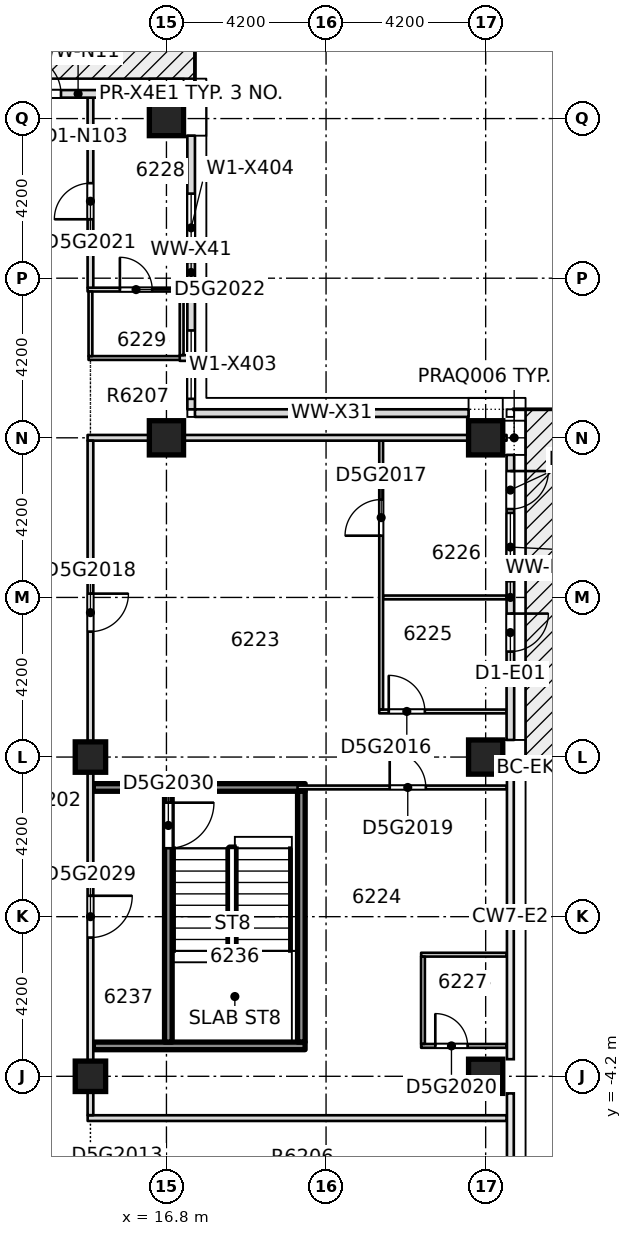
"""IFC4 building model, lengths in metres.
Left out: names, types, materials, properties, quantities, classifications, styles, units other than length and angle.
Written with IfcOpenShell. Run it as: python <this file> out.ifc"""

import sys

from ifc_helpers import new_model, si_unit, direction, frame, frame_2d, origin, origin_2d, place, context, subcontext, project, spatial, rectangle, extrude, element, fill, save


model = new_model("IFC4")
c1 = context("Model", 3, precision=1e-05, world=origin(), true_north=direction((0.0, 1.0)))
c2 = subcontext(c1, "Body", "Model", "MODEL_VIEW")
j1 = project(units=[si_unit("LENGTHUNIT", "METRE"), si_unit("PLANEANGLEUNIT", "RADIAN")], contexts=[c1])
p1 = place(None, origin())
s1 = spatial("IfcSite", under=j1, at=p1, CompositionType="ELEMENT")
p2 = place(p1, origin())
s2 = spatial("IfcBuilding", under=s1, at=p2, CompositionType="ELEMENT")
p3 = place(p2, frame((0.0, 0.0, 237.25)))
s3 = spatial("IfcBuildingStorey", under=s2, at=p3, CompositionType="ELEMENT", Elevation=237.25)
for number, where, z_axis, x_axis in (
    (1, (25.2, -4.2, -0.4), (0.0, 0.0, 1.0), (1.0, 0.0, 0.0)),
    (2, (25.2, 4.2, -0.4), (0.0, 0.0, 1.0), (1.0, 0.0, 0.0)),
    (3, (16.8, 12.6, -0.4), (0.0, 0.0, 1.0), (1.0, 0.0, 0.0)),
    (4, (25.2, 12.6, -0.4), (0.0, 0.0, 1.0), (1.0, 0.0, 0.0)),
    (5, (16.8, 21.0, -0.4), (0.0, 0.0, 1.0), (1.0, 0.0, 0.0)),
):
    element("IfcColumn", number, at=place(p3, frame(where, z_axis=z_axis, x_axis=x_axis)), inside=s3, PredefinedType="COLUMN", context=c2, shape_type="SweptSolid", body=[
        extrude(rectangle(XDim=0.9, YDim=0.9, at=origin_2d()), origin(), (0.0, 0.0, 1.0), 3.45),
    ])
for number, where, z_axis, x_axis in (
    (6, (14.8, -4.2, -0.4), (0.0, 0.0, 1.0), (1.0, 0.0, 0.0)),
    (7, (14.8, 4.2, -0.4), (0.0, 0.0, 1.0), (1.0, 0.0, 0.0)),
):
    element("IfcColumn", number, at=place(p3, frame(where, z_axis=z_axis, x_axis=x_axis)), inside=s3, PredefinedType="COLUMN", context=c2, shape_type="SweptSolid", body=[
        extrude(rectangle(XDim=0.8, YDim=0.8, at=origin_2d()), origin(), (0.0, 0.0, 1.0), 3.45),
    ])
p4 = place(p3, frame((14.727, -5.3, 0.0), z_axis=(0.0, 0.0, 1.0), x_axis=(1.0, 0.0, 0.0)))
e8 = element("IfcWall", 8, at=p4, inside=s3, PredefinedType="PARTITIONING", context=c2, shape_type="SweptSolid", body=[
    extrude(rectangle(XDim=11.023, YDim=0.15, at=frame_2d((5.511, 0.0))), origin(), (0.0, 0.0, 1.0), 3.05),
])
p5 = place(p3, frame((14.877, -3.4, 0.0), z_axis=(0.0, 0.0, 1.0), x_axis=(1.0, 0.0, 0.0)))
e9 = element("IfcWall", 9, at=p5, inside=s3, PredefinedType="SOLIDWALL", context=c2, shape_type="SweptSolid", body=[
    extrude(rectangle(XDim=5.571, YDim=0.2, at=frame_2d((2.786, 0.0))), origin(), (0.0, 0.0, 1.0), 3.05),
])
p6 = place(p3, frame((23.502, -3.4, 0.0), z_axis=(0.0, 0.0, 1.0), x_axis=(1.0, 0.0, 0.0)))
e10 = element("IfcWall", 10, at=p6, inside=s3, PredefinedType="PARTITIONING", context=c2, shape_type="SweptSolid", body=[
    extrude(rectangle(XDim=2.248, YDim=0.1, at=frame_2d((1.124, 0.0))), origin(), (0.0, 0.0, 1.0), 3.05),
])
p7 = place(p6, frame((0.373, 0.0, 0.0)))
e11 = element("IfcOpeningElement", 11, at=p7, cuts=e10, PredefinedType="OPENING", context=c2, shape_type="SweptSolid", body=[
    extrude(rectangle(XDim=0.85, YDim=2.1, at=frame_2d((0.425, 1.05))), frame((0.0, 0.06, 0.0), z_axis=(0.0, -1.0, 0.0), x_axis=(1.0, 0.0, 0.0)), (0.0, 0.0, 1.0), 0.12),
])
p8 = place(p3, frame((23.502, -1.0, 0.0), z_axis=(0.0, 0.0, 1.0), x_axis=(1.0, 0.0, 0.0)))
e12 = element("IfcWall", 12, at=p8, inside=s3, PredefinedType="PARTITIONING", context=c2, shape_type="SweptSolid", body=[
    extrude(rectangle(XDim=2.248, YDim=0.1, at=frame_2d((1.124, 0.0))), origin(), (0.0, 0.0, 1.0), 3.05),
])
p9 = place(p3, frame((14.875, 3.4, 0.0), z_axis=(0.0, 0.0, 1.0), x_axis=(1.0, 0.0, 0.0)))
e13 = element("IfcWall", 13, at=p9, inside=s3, PredefinedType="SOLIDWALL", context=c2, shape_type="SweptSolid", body=[
    extrude(rectangle(XDim=5.575, YDim=0.2, at=frame_2d((2.788, 0.0))), origin(), (0.0, 0.0, 1.0), 3.05),
])
p10 = place(p3, frame((20.25, 3.4, 0.0), z_axis=(0.0, 0.0, 1.0), x_axis=(1.0, 0.0, 0.0)))
e14 = element("IfcWall", 14, at=p10, inside=s3, PredefinedType="PARTITIONING", context=c2, shape_type="SweptSolid", body=[
    extrude(rectangle(XDim=5.5, YDim=0.1, at=frame_2d((2.75, 0.0))), origin(), (0.0, 0.0, 1.0), 3.05),
])
p11 = place(p10, frame((2.425, 0.0, 0.0)))
e15 = element("IfcOpeningElement", 15, at=p11, cuts=e14, PredefinedType="OPENING", context=c2, shape_type="SweptSolid", body=[
    extrude(rectangle(XDim=0.95, YDim=2.1, at=frame_2d((0.475, 1.05))), frame((0.0, 0.06, 0.0), z_axis=(0.0, -1.0, 0.0), x_axis=(1.0, 0.0, 0.0)), (0.0, 0.0, 1.0), 0.12),
])
p12 = place(p3, frame((22.4, 5.4, 0.0), z_axis=(0.0, 0.0, 1.0), x_axis=(1.0, 0.0, 0.0)))
e16 = element("IfcWall", 16, at=p12, inside=s3, PredefinedType="PARTITIONING", context=c2, shape_type="SweptSolid", body=[
    extrude(rectangle(XDim=3.35, YDim=0.1, at=frame_2d((1.675, 0.0))), origin(), (0.0, 0.0, 1.0), 3.05),
])
p13 = place(p12, frame((0.25, 0.0, 0.0)))
e17 = element("IfcOpeningElement", 17, at=p13, cuts=e16, PredefinedType="OPENING", context=c2, shape_type="SweptSolid", body=[
    extrude(rectangle(XDim=0.95, YDim=2.1, at=frame_2d((0.475, 1.05))), frame((0.0, 0.06, 0.0), z_axis=(0.0, -1.0, 0.0), x_axis=(1.0, 0.0, 0.0)), (0.0, 0.0, 1.0), 0.12),
])
p14 = place(p3, frame((22.5, 8.4, 0.0), z_axis=(0.0, 0.0, 1.0), x_axis=(1.0, 0.0, 0.0)))
e18 = element("IfcWall", 18, at=p14, inside=s3, PredefinedType="PARTITIONING", context=c2, shape_type="SweptSolid", body=[
    extrude(rectangle(XDim=3.25, YDim=0.1, at=frame_2d((1.625, 0.0))), origin(), (0.0, 0.0, 1.0), 3.05),
])
p15 = place(p3, frame((14.725, 12.6, 0.0), z_axis=(0.0, 0.0, 1.0), x_axis=(1.0, 0.0, 0.0)))
e19 = element("IfcWall", 19, at=p15, inside=s3, PredefinedType="PARTITIONING", context=c2, shape_type="SweptSolid", body=[
    extrude(rectangle(XDim=2.525, YDim=0.15, at=frame_2d((1.262, 0.0))), origin(), (0.0, 0.0, 1.0), 3.05),
])
p16 = place(p3, frame((14.75, 14.7, 0.0), z_axis=(0.0, 0.0, 1.0), x_axis=(1.0, 0.0, 0.0)))
e20 = element("IfcWall", 20, at=p16, inside=s3, PredefinedType="PARTITIONING", context=c2, shape_type="SweptSolid", body=[
    extrude(rectangle(XDim=2.5, YDim=0.1, at=frame_2d((1.25, 0.0))), origin(), (0.0, 0.0, 1.0), 3.05),
])
p17 = place(p3, frame((17.15, 14.7, 0.0), z_axis=(0.0, 0.0, 1.0), x_axis=(1.0, 0.0, 0.0)))
e21 = element("IfcWall", 21, at=p17, inside=s3, PredefinedType="PARTITIONING", context=c2, shape_type="SweptSolid", body=[
    extrude(rectangle(XDim=0.2, YDim=0.15, at=frame_2d((0.1, 0.0))), origin(), (0.0, 0.0, 1.0), 3.05),
])
p18 = place(p3, frame((14.725, 16.5, 0.0), z_axis=(0.0, 0.0, 1.0), x_axis=(1.0, 0.0, 0.0)))
e22 = element("IfcWall", 22, at=p18, inside=s3, PredefinedType="PARTITIONING", context=c2, shape_type="SweptSolid", body=[
    extrude(rectangle(XDim=2.525, YDim=0.1, at=frame_2d((1.262, 0.0))), origin(), (0.0, 0.0, 1.0), 3.05),
])
p19 = place(p18, frame((0.85, 0.0, 0.0)))
e23 = element("IfcOpeningElement", 23, at=p19, cuts=e22, PredefinedType="OPENING", context=c2, shape_type="SweptSolid", body=[
    extrude(rectangle(XDim=0.85, YDim=2.1, at=frame_2d((0.425, 1.05))), frame((0.0, 0.06, 0.0), z_axis=(0.0, -1.0, 0.0), x_axis=(1.0, 0.0, 0.0)), (0.0, 0.0, 1.0), 0.12),
])
p20 = place(p3, frame((14.8, -5.223, 0.0), z_axis=(0.0, 0.0, 1.0), x_axis=(0.0, 1.0, 0.0)))
e24 = element("IfcWall", 24, at=p20, inside=s3, PredefinedType="PARTITIONING", context=c2, shape_type="SweptSolid", body=[
    extrude(rectangle(XDim=17.748, YDim=0.15, at=frame_2d((8.874, 0.0))), origin(), (0.0, 0.0, 1.0), 3.05),
])
p21 = place(p20, frame((12.723, 0.0, 0.0)))
e25 = element("IfcOpeningElement", 25, at=p21, cuts=e24, PredefinedType="OPENING", context=c2, shape_type="SweptSolid", body=[
    extrude(rectangle(XDim=1.0, YDim=2.1, at=frame_2d((0.5, 1.05))), frame((0.0, 0.085, 0.0), z_axis=(0.0, -1.0, 0.0), x_axis=(1.0, 0.0, 0.0)), (0.0, 0.0, 1.0), 0.17),
])
p22 = place(p20, frame((4.673, 0.0, 0.0)))
e26 = element("IfcOpeningElement", 26, at=p22, cuts=e24, PredefinedType="OPENING", context=c2, shape_type="SweptSolid", body=[
    extrude(rectangle(XDim=1.1, YDim=2.1, at=frame_2d((0.55, 1.05))), frame((0.0, 0.085, 0.0), z_axis=(0.0, -1.0, 0.0), x_axis=(1.0, 0.0, 0.0)), (0.0, 0.0, 1.0), 0.17),
])
p23 = place(p3, frame((14.8, 14.75, 0.0), z_axis=(0.0, 0.0, 1.0), x_axis=(0.0, 1.0, 0.0)))
e27 = element("IfcWall", 27, at=p23, inside=s3, PredefinedType="PARTITIONING", context=c2, shape_type="SweptSolid", body=[
    extrude(rectangle(XDim=1.7, YDim=0.1, at=frame_2d((0.85, 0.0))), origin(), (0.0, 0.0, 1.0), 3.05),
])
p24 = place(p3, frame((14.8, 16.55, 0.0), z_axis=(0.0, 0.0, 1.0), x_axis=(0.0, 1.0, 0.0)))
e28 = element("IfcWall", 28, at=p24, inside=s3, PredefinedType="PARTITIONING", context=c2, shape_type="SweptSolid", body=[
    extrude(rectangle(XDim=5.0, YDim=0.15, at=frame_2d((2.5, 0.0))), origin(), (0.0, 0.0, 1.0), 3.05),
])
p25 = place(p24, frame((1.8, 0.0, 0.0)))
e29 = element("IfcOpeningElement", 29, at=p25, cuts=e28, PredefinedType="OPENING", context=c2, shape_type="SweptSolid", body=[
    extrude(rectangle(XDim=0.95, YDim=2.1, at=frame_2d((0.475, 1.05))), frame((0.0, 0.085, 0.0), z_axis=(0.0, -1.0, 0.0), x_axis=(1.0, 0.0, 0.0)), (0.0, 0.0, 1.0), 0.17),
])
p26 = place(p3, frame((16.85, -3.3, 0.0), z_axis=(0.0, 0.0, 1.0), x_axis=(0.0, 1.0, 0.0)))
e30 = element("IfcWall", 30, at=p26, inside=s3, PredefinedType="SOLIDWALL", context=c2, shape_type="SweptSolid", body=[
    extrude(rectangle(XDim=6.6, YDim=0.2, at=frame_2d((3.3, 0.0))), origin(), (0.0, 0.0, 1.0), 3.05),
])
p27 = place(p26, frame((5.1, 0.0, 0.0)))
e31 = element("IfcOpeningElement", 31, at=p27, cuts=e30, PredefinedType="OPENING", context=c2, shape_type="SweptSolid", body=[
    extrude(rectangle(XDim=1.2, YDim=2.1, at=frame_2d((0.6, 1.05))), frame((0.0, 0.11, 0.0), z_axis=(0.0, -1.0, 0.0), x_axis=(1.0, 0.0, 0.0)), (0.0, 0.0, 1.0), 0.22),
])
p28 = place(p3, frame((17.2, 14.775, 0.0), z_axis=(0.0, 0.0, 1.0), x_axis=(0.0, 1.0, 0.0)))
e32 = element("IfcWall", 32, at=p28, inside=s3, PredefinedType="PARTITIONING", context=c2, shape_type="SweptSolid", body=[
    extrude(rectangle(XDim=1.675, YDim=0.1, at=frame_2d((0.837, 0.0))), origin(), (0.0, 0.0, 1.0), 3.05),
])
p29 = place(p3, frame((22.45, 5.45, 0.0), z_axis=(0.0, 0.0, 1.0), x_axis=(0.0, 1.0, 0.0)))
e33 = element("IfcWall", 33, at=p29, inside=s3, PredefinedType="PARTITIONING", context=c2, shape_type="SweptSolid", body=[
    extrude(rectangle(XDim=7.075, YDim=0.1, at=frame_2d((3.538, 0.0))), origin(), (0.0, 0.0, 1.0), 3.05),
])
p30 = place(p29, frame((4.575, 0.0, 0.0)))
e34 = element("IfcOpeningElement", 34, at=p30, cuts=e33, PredefinedType="OPENING", context=c2, shape_type="SweptSolid", body=[
    extrude(rectangle(XDim=0.95, YDim=2.1, at=frame_2d((0.475, 1.05))), frame((0.0, 0.06, 0.0), z_axis=(0.0, -1.0, 0.0), x_axis=(1.0, 0.0, 0.0)), (0.0, 0.0, 1.0), 0.12),
])
p31 = place(p3, frame((23.55, -3.348, 0.0), z_axis=(0.0, 0.0, 1.0), x_axis=(0.0, 1.0, 0.0)))
e35 = element("IfcWall", 35, at=p31, inside=s3, PredefinedType="PARTITIONING", context=c2, shape_type="SweptSolid", body=[
    extrude(rectangle(XDim=2.296, YDim=0.1, at=frame_2d((1.148, 0.0))), origin(), (0.0, 0.0, 1.0), 3.05),
])
p32 = place(p3, frame((25.85, 4.65, 0.0), z_axis=(0.0, 0.0, 1.0), x_axis=(0.0, 1.0, 0.0)))
e36 = element("IfcWall", 36, at=p32, inside=s3, PredefinedType="STANDARD", context=c2, shape_type="SweptSolid", body=[
    extrude(rectangle(XDim=7.5, YDim=0.2, at=frame_2d((3.75, 0.0))), origin(), (0.0, 0.0, 1.0), 3.05),
])
p33 = place(p32, frame((2.325, 0.0, 0.0)))
e37 = element("IfcOpeningElement", 37, at=p33, cuts=e36, PredefinedType="OPENING", context=c2, shape_type="SweptSolid", body=[
    extrude(rectangle(XDim=1.0, YDim=2.4, at=frame_2d((0.5, 1.2))), frame((0.0, 0.11, 0.0), z_axis=(0.0, -1.0, 0.0), x_axis=(1.0, 0.0, 0.0)), (0.0, 0.0, 1.0), 0.22),
])
p34 = place(p32, frame((4.175, 0.0, 0.2)))
e38 = element("IfcOpeningElement", 38, at=p34, cuts=e36, PredefinedType="OPENING", context=c2, shape_type="SweptSolid", body=[
    extrude(rectangle(XDim=1.8, YDim=2.65, at=frame_2d((0.9, 1.325))), frame((0.0, 0.11, 0.0), z_axis=(0.0, -1.0, 0.0), x_axis=(1.0, 0.0, 0.0)), (0.0, 0.0, 1.0), 0.22),
])
p35 = place(p32, frame((6.075, 0.0, 0.0)))
e39 = element("IfcOpeningElement", 39, at=p35, cuts=e36, PredefinedType="OPENING", context=c2, shape_type="SweptSolid", body=[
    extrude(rectangle(XDim=1.0, YDim=2.4, at=frame_2d((0.5, 1.2))), frame((0.0, 0.11, 0.0), z_axis=(0.0, -1.0, 0.0), x_axis=(1.0, 0.0, 0.0)), (0.0, 0.0, 1.0), 0.22),
])
p36 = place(p3, frame((24.75, 13.25, 0.0), z_axis=(0.0, 0.0, 1.0), x_axis=(-1.0, 0.0, 0.0)))
e40 = element("IfcWall", 40, at=p36, inside=s3, PredefinedType="STANDARD", context=c2, shape_type="SweptSolid", body=[
    extrude(rectangle(XDim=7.2, YDim=0.2, at=frame_2d((3.6, 0.0))), origin(), (0.0, 0.0, 1.0), 3.05),
])
p37 = place(p3, frame((17.45, 13.35, 0.0), z_axis=(0.0, 0.0, 1.0), x_axis=(0.0, 1.0, 0.0)))
e41 = element("IfcWall", 41, at=p37, inside=s3, PredefinedType="STANDARD", context=c2, shape_type="SweptSolid", body=[
    extrude(rectangle(XDim=7.2, YDim=0.2, at=frame_2d((3.6, 0.0))), origin(), (0.0, 0.0, 1.0), 3.05),
])
p38 = place(p37, frame((0.275, 0.0, 0.2)))
e42 = element("IfcOpeningElement", 42, at=p38, cuts=e41, PredefinedType="OPENING", context=c2, shape_type="SweptSolid", body=[
    extrude(rectangle(XDim=1.8, YDim=2.65, at=frame_2d((0.9, 1.325))), frame((0.0, 0.11, 0.0), z_axis=(0.0, -1.0, 0.0), x_axis=(1.0, 0.0, 0.0)), (0.0, 0.0, 1.0), 0.22),
])
p39 = place(p37, frame((3.875, 0.0, 0.2)))
e43 = element("IfcOpeningElement", 43, at=p39, cuts=e41, PredefinedType="OPENING", context=c2, shape_type="SweptSolid", body=[
    extrude(rectangle(XDim=1.8, YDim=2.65, at=frame_2d((0.9, 1.325))), frame((0.0, 0.11, 0.0), z_axis=(0.0, -1.0, 0.0), x_axis=(1.0, 0.0, 0.0)), (0.0, 0.0, 1.0), 0.22),
])
p40 = place(p3, frame((16.35, 21.65, 0.0), z_axis=(0.0, 0.0, 1.0), x_axis=(-1.0, 0.0, 0.0)))
e44 = element("IfcWall", 44, at=p40, inside=s3, PredefinedType="STANDARD", context=c2, shape_type="SweptSolid", body=[
    extrude(rectangle(XDim=3.75, YDim=0.2, at=frame_2d((1.875, 0.0))), origin(), (0.0, 0.0, 1.0), 3.05),
])
p41 = place(p40, frame((2.325, 0.0, 0.0)))
e45 = element("IfcOpeningElement", 45, at=p41, cuts=e44, PredefinedType="OPENING", context=c2, shape_type="SweptSolid", body=[
    extrude(rectangle(XDim=1.0, YDim=2.4, at=frame_2d((0.5, 1.2))), frame((0.0, 0.11, 0.0), z_axis=(0.0, -1.0, 0.0), x_axis=(1.0, 0.0, 0.0)), (0.0, 0.0, 1.0), 0.22),
])
p42 = place(p3, frame((20.35, -3.298, 0.0), z_axis=(0.0, 0.0, 1.0), x_axis=(0.0, 1.0, 0.0)))
e46 = element("IfcWall", 46, at=p42, inside=s3, PredefinedType="SOLIDWALL", context=c2, shape_type="SweptSolid", body=[
    extrude(rectangle(XDim=6.598, YDim=0.2, at=frame_2d((3.299, 0.0))), origin(), (0.0, 0.0, 1.0), 3.05),
])
p43 = place(p3, frame((17.25, 12.6, 0.0), z_axis=(0.0, 0.0, 1.0), x_axis=(1.0, 0.0, 0.0)))
e47 = element("IfcWall", 47, at=p43, inside=s3, PredefinedType="PARTITIONING", context=c2, shape_type="SweptSolid", body=[
    extrude(rectangle(XDim=7.5, YDim=0.15, at=frame_2d((3.75, 0.0))), origin(), (0.0, 0.0, 1.0), 2.5),
])
p44 = place(p3, frame((24.75, 12.6, 0.0), z_axis=(0.0, 0.0, 1.0), x_axis=(1.0, 0.0, 0.0)))
e48 = element("IfcWall", 48, at=p44, inside=s3, PredefinedType="PARTITIONING", context=c2, shape_type="SweptSolid", body=[
    extrude(rectangle(XDim=1.0, YDim=0.15, at=frame_2d((0.5, 0.0))), origin(), (0.0, 0.0, 1.0), 3.05),
])
p45 = place(p13, origin())
e49 = element("IfcDoor", 49, at=p45, inside=s3, OperationType="SINGLE_SWING_LEFT", PredefinedType="DOOR", context=c2, shape_type="SweptSolid", body=[
    extrude(rectangle(XDim=0.95, YDim=2.1, at=frame_2d((0.475, 1.05))), frame((0.0, 0.025, 0.0), z_axis=(0.0, -1.0, 0.0), x_axis=(1.0, 0.0, 0.0)), (0.0, 0.0, 1.0), 0.05),
])
fill(e17, e49)
p46 = place(p30, origin())
e50 = element("IfcDoor", 50, at=p46, inside=s3, OperationType="SINGLE_SWING_RIGHT", PredefinedType="DOOR", context=c2, shape_type="SweptSolid", body=[
    extrude(rectangle(XDim=0.95, YDim=2.1, at=frame_2d((0.475, 1.05))), frame((0.0, 0.025, 0.0), z_axis=(0.0, -1.0, 0.0), x_axis=(1.0, 0.0, 0.0)), (0.0, 0.0, 1.0), 0.05),
])
fill(e34, e50)
p47 = place(p21, origin())
e51 = element("IfcDoor", 51, at=p47, inside=s3, OperationType="SINGLE_SWING_LEFT", PredefinedType="DOOR", context=c2, shape_type="SweptSolid", body=[
    extrude(rectangle(XDim=1.0, YDim=2.1, at=frame_2d((0.5, 1.05))), frame((0.0, 0.025, 0.0), z_axis=(0.0, -1.0, 0.0), x_axis=(1.0, 0.0, 0.0)), (0.0, 0.0, 1.0), 0.05),
])
fill(e25, e51)
p48 = place(p11, origin())
e52 = element("IfcDoor", 52, at=p48, inside=s3, OperationType="SINGLE_SWING_LEFT", PredefinedType="DOOR", context=c2, shape_type="SweptSolid", body=[
    extrude(rectangle(XDim=0.95, YDim=2.1, at=frame_2d((0.475, 1.05))), frame((0.0, 0.025, 0.0), z_axis=(0.0, -1.0, 0.0), x_axis=(1.0, 0.0, 0.0)), (0.0, 0.0, 1.0), 0.05),
])
fill(e15, e52)
p49 = place(p7, origin())
e53 = element("IfcDoor", 53, at=p49, inside=s3, OperationType="SINGLE_SWING_LEFT", PredefinedType="DOOR", context=c2, shape_type="SweptSolid", body=[
    extrude(rectangle(XDim=0.85, YDim=2.1, at=frame_2d((0.425, 1.05))), frame((0.0, 0.025, 0.0), z_axis=(0.0, -1.0, 0.0), x_axis=(1.0, 0.0, 0.0)), (0.0, 0.0, 1.0), 0.05),
])
fill(e11, e53)
p50 = place(p25, origin())
e54 = element("IfcDoor", 54, at=p50, inside=s3, OperationType="SINGLE_SWING_LEFT", PredefinedType="DOOR", context=c2, shape_type="SweptSolid", body=[
    extrude(rectangle(XDim=0.95, YDim=2.1, at=frame_2d((0.475, 1.05))), frame((0.0, 0.025, 0.0), z_axis=(0.0, -1.0, 0.0), x_axis=(1.0, 0.0, 0.0)), (0.0, 0.0, 1.0), 0.05),
])
fill(e29, e54)
p51 = place(p19, origin())
e55 = element("IfcDoor", 55, at=p51, inside=s3, OperationType="SINGLE_SWING_RIGHT", PredefinedType="DOOR", context=c2, shape_type="SweptSolid", body=[
    extrude(rectangle(XDim=0.85, YDim=2.1, at=frame_2d((0.425, 1.05))), frame((0.0, 0.025, 0.0), z_axis=(0.0, -1.0, 0.0), x_axis=(1.0, 0.0, 0.0)), (0.0, 0.0, 1.0), 0.05),
])
fill(e23, e55)
p52 = place(p22, origin())
e56 = element("IfcDoor", 56, at=p52, inside=s3, OperationType="SINGLE_SWING_RIGHT", PredefinedType="DOOR", context=c2, shape_type="SweptSolid", body=[
    extrude(rectangle(XDim=1.1, YDim=2.1, at=frame_2d((0.55, 1.05))), frame((0.0, 0.025, 0.0), z_axis=(0.0, -1.0, 0.0), x_axis=(1.0, 0.0, 0.0)), (0.0, 0.0, 1.0), 0.05),
])
fill(e26, e56)
p53 = place(p27, origin())
e57 = element("IfcDoor", 57, at=p53, inside=s3, OperationType="SINGLE_SWING_LEFT", PredefinedType="DOOR", context=c2, shape_type="SweptSolid", body=[
    extrude(rectangle(XDim=1.2, YDim=2.1, at=frame_2d((0.6, 1.05))), frame((0.0, 0.025, 0.0), z_axis=(0.0, -1.0, 0.0), x_axis=(1.0, 0.0, 0.0)), (0.0, 0.0, 1.0), 0.05),
])
fill(e31, e57)
p54 = place(p33, origin())
e58 = element("IfcDoor", 58, at=p54, inside=s3, OperationType="SINGLE_SWING_LEFT", PredefinedType="DOOR", context=c2, shape_type="SweptSolid", body=[
    extrude(rectangle(XDim=1.0, YDim=2.4, at=frame_2d((0.5, 1.2))), frame((0.0, 0.025, 0.0), z_axis=(0.0, -1.0, 0.0), x_axis=(1.0, 0.0, 0.0)), (0.0, 0.0, 1.0), 0.05),
])
fill(e37, e58)
p55 = place(p34, origin())
e59 = element("IfcWindow", 59, at=p55, inside=s3, PartitioningType="SINGLE_PANEL", PredefinedType="WINDOW", context=c2, shape_type="SweptSolid", body=[
    extrude(rectangle(XDim=1.8, YDim=2.65, at=frame_2d((0.9, 1.325))), frame((0.0, 0.03, 0.0), z_axis=(0.0, -1.0, 0.0), x_axis=(1.0, 0.0, 0.0)), (0.0, 0.0, 1.0), 0.06),
])
fill(e38, e59)
p56 = place(p35, origin())
e60 = element("IfcDoor", 60, at=p56, inside=s3, OperationType="SINGLE_SWING_LEFT", PredefinedType="DOOR", context=c2, shape_type="SweptSolid", body=[
    extrude(rectangle(XDim=1.0, YDim=2.4, at=frame_2d((0.5, 1.2))), frame((0.0, 0.025, 0.0), z_axis=(0.0, -1.0, 0.0), x_axis=(1.0, 0.0, 0.0)), (0.0, 0.0, 1.0), 0.05),
])
fill(e39, e60)
p57 = place(p38, origin())
e61 = element("IfcWindow", 61, at=p57, inside=s3, PartitioningType="SINGLE_PANEL", PredefinedType="WINDOW", context=c2, shape_type="SweptSolid", body=[
    extrude(rectangle(XDim=1.8, YDim=2.65, at=frame_2d((0.9, 1.325))), frame((0.0, 0.03, 0.0), z_axis=(0.0, -1.0, 0.0), x_axis=(1.0, 0.0, 0.0)), (0.0, 0.0, 1.0), 0.06),
])
fill(e42, e61)
p58 = place(p39, origin())
e62 = element("IfcWindow", 62, at=p58, inside=s3, PartitioningType="SINGLE_PANEL", PredefinedType="WINDOW", context=c2, shape_type="SweptSolid", body=[
    extrude(rectangle(XDim=1.8, YDim=2.65, at=frame_2d((0.9, 1.325))), frame((0.0, 0.03, 0.0), z_axis=(0.0, -1.0, 0.0), x_axis=(1.0, 0.0, 0.0)), (0.0, 0.0, 1.0), 0.06),
])
fill(e43, e62)
p59 = place(p41, origin())
e63 = element("IfcDoor", 63, at=p59, inside=s3, OperationType="SINGLE_SWING_LEFT", PredefinedType="DOOR", context=c2, shape_type="SweptSolid", body=[
    extrude(rectangle(XDim=1.0, YDim=2.4, at=frame_2d((0.5, 1.2))), frame((0.0, 0.025, 0.0), z_axis=(0.0, -1.0, 0.0), x_axis=(1.0, 0.0, 0.0)), (0.0, 0.0, 1.0), 0.05),
])
fill(e45, e63)
save(model, sys.argv[1])
